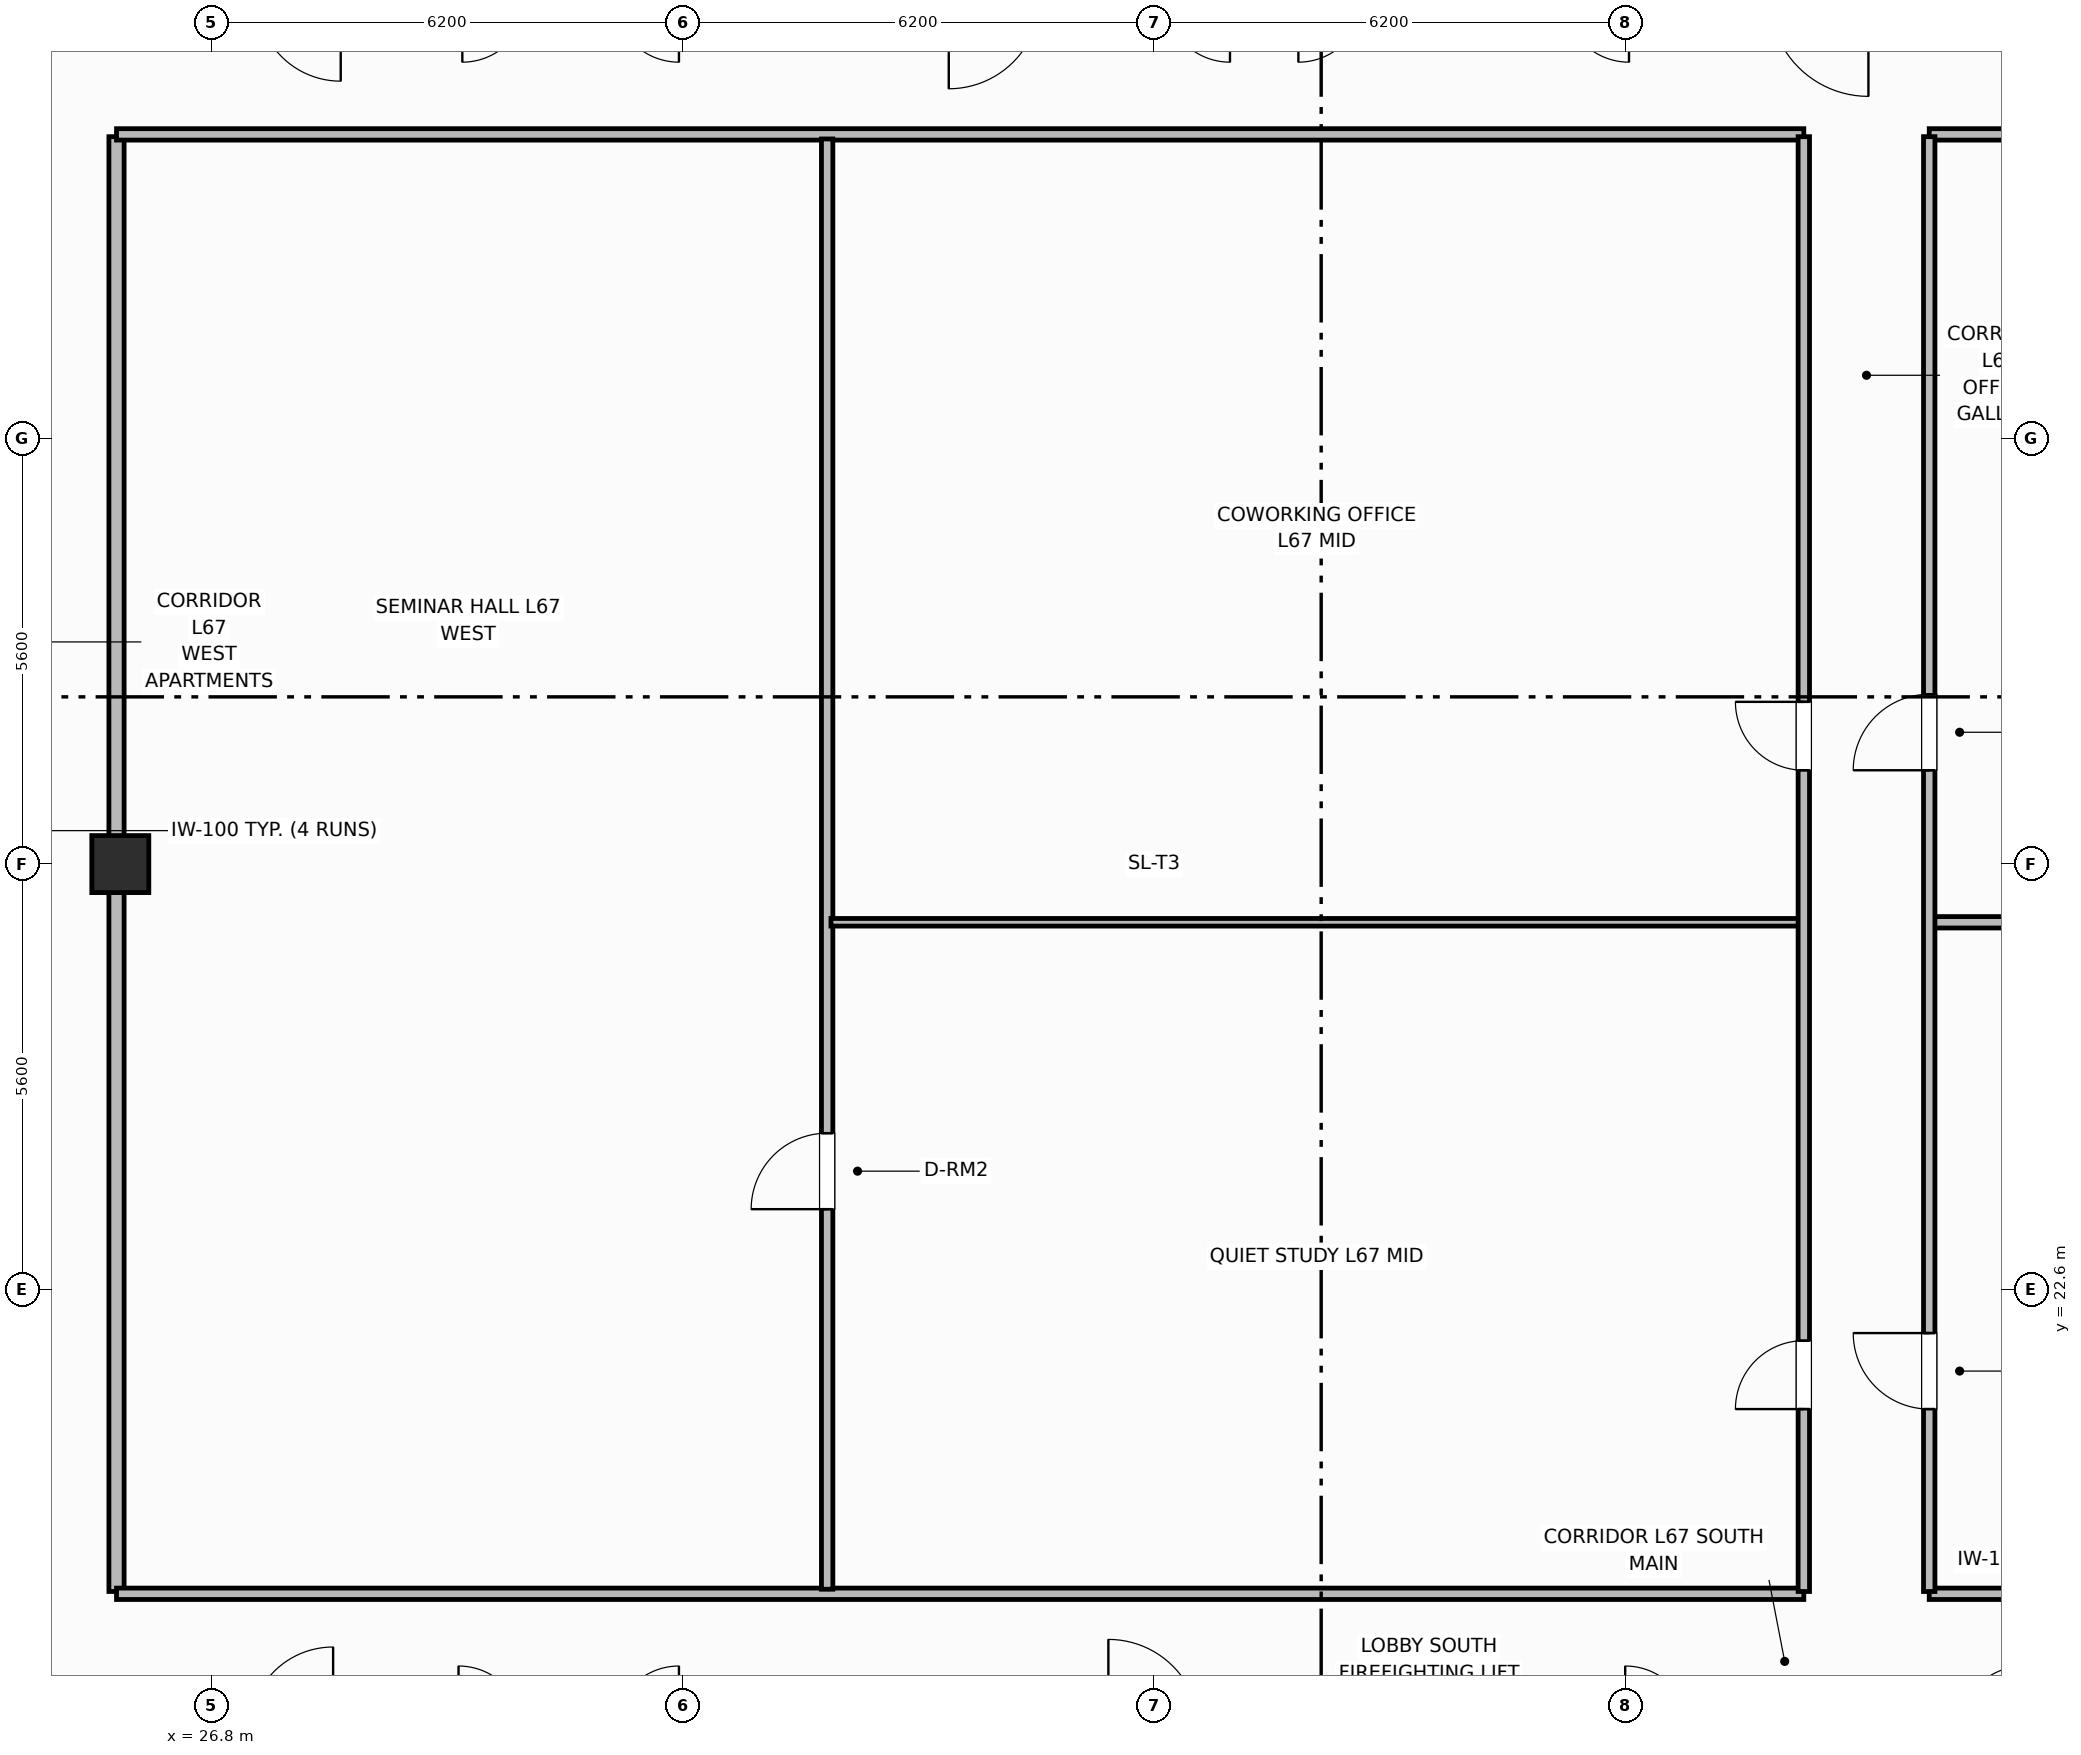
"""IFC4 building model, lengths in metres.
Left out: names, types, materials, properties, quantities, classifications, styles, units other than length and angle.
Written with IfcOpenShell. Run it as: python <this file> out.ifc"""

import sys

from ifc_helpers import new_model, si_unit, direction, frame, frame_2d, origin, origin_2d, place, context, subcontext, project, spatial, rectangle, extrude, element, fill, save


model = new_model("IFC4")
c1 = context("Model", 3, precision=1e-05, world=origin(), true_north=direction((0.0, 1.0)))
c2 = subcontext(c1, "Body", "Model", "MODEL_VIEW")
j1 = project(units=[si_unit("LENGTHUNIT", "METRE"), si_unit("PLANEANGLEUNIT", "RADIAN")], contexts=[c1])
p1 = place(None, origin())
s1 = spatial("IfcSite", under=j1, at=p1, CompositionType="ELEMENT")
p2 = place(p1, origin())
s2 = spatial("IfcBuilding", under=s1, at=p2, CompositionType="ELEMENT")
p3 = place(p2, frame((0.0, 0.0, 267.6)))
s3 = spatial("IfcBuildingStorey", under=s2, at=p3, CompositionType="ELEMENT", Elevation=267.6)
p4 = place(p3, frame((25.6, 28.2, 0.0), z_axis=(0.0, 0.0, 1.0), x_axis=(1.0, 0.0, 0.0)))
e1 = element("IfcColumn", 1, at=p4, inside=s3, PredefinedType="COLUMN", context=c2, shape_type="SweptSolid", body=[
    extrude(rectangle(XDim=0.75, YDim=0.75, at=origin_2d()), origin(), (0.0, 0.0, 1.0), 3.7),
])
p5 = place(p3, frame((25.55, 18.63, 0.0), z_axis=(0.0, 0.0, 1.0), x_axis=(0.0, 1.0, 0.0)))
e2 = element("IfcWall", 2, at=p5, inside=s3, PredefinedType="PARTITIONING", context=c2, shape_type="SweptSolid", body=[
    extrude(rectangle(XDim=19.14, YDim=0.2, at=frame_2d((9.57, 0.0))), origin(), (0.0, 0.0, 1.0), 2.56),
])
p6 = place(p3, frame((25.55, 18.6, 0.0), z_axis=(0.0, 0.0, 1.0), x_axis=(1.0, 0.0, 0.0)))
e3 = element("IfcWall", 3, at=p6, inside=s3, PredefinedType="PARTITIONING", context=c2, shape_type="SweptSolid", body=[
    extrude(rectangle(XDim=22.2, YDim=0.15, at=frame_2d((11.1, 0.0))), origin(), (0.0, 0.0, 1.0), 2.56),
])
p7 = place(p3, frame((49.4, 18.6, 0.0), z_axis=(0.0, 0.0, 1.0), x_axis=(1.0, 0.0, 0.0)))
e4 = element("IfcWall", 4, at=p7, inside=s3, PredefinedType="PARTITIONING", context=c2, shape_type="SweptSolid", body=[
    extrude(rectangle(XDim=3.45, YDim=0.15, at=frame_2d((1.725, 0.0))), origin(), (0.0, 0.0, 1.0), 2.56),
])
p8 = place(p3, frame((25.55, 37.8, 0.0), z_axis=(0.0, 0.0, 1.0), x_axis=(1.0, 0.0, 0.0)))
e5 = element("IfcWall", 5, at=p8, inside=s3, PredefinedType="PARTITIONING", context=c2, shape_type="SweptSolid", body=[
    extrude(rectangle(XDim=22.2, YDim=0.15, at=frame_2d((11.1, 0.0))), origin(), (0.0, 0.0, 1.0), 2.56),
])
p9 = place(p3, frame((49.4, 37.8, 0.0), z_axis=(0.0, 0.0, 1.0), x_axis=(1.0, 0.0, 0.0)))
e6 = element("IfcWall", 6, at=p9, inside=s3, PredefinedType="PARTITIONING", context=c2, shape_type="SweptSolid", body=[
    extrude(rectangle(XDim=3.45, YDim=0.15, at=frame_2d((1.725, 0.0))), origin(), (0.0, 0.0, 1.0), 2.56),
])
p10 = place(p3, frame((34.9, 18.66, 0.0), z_axis=(0.0, 0.0, 1.0), x_axis=(0.0, 1.0, 0.0)))
e7 = element("IfcWall", 7, at=p10, inside=s3, PredefinedType="PARTITIONING", context=c2, shape_type="SweptSolid", body=[
    extrude(rectangle(XDim=19.08, YDim=0.15, at=frame_2d((9.54, 0.0))), origin(), (0.0, 0.0, 1.0), 2.56),
])
p11 = place(p10, frame((5.0, 0.0, 0.0)))
e8 = element("IfcOpeningElement", 8, at=p11, cuts=e7, PredefinedType="OPENING", context=c2, shape_type="SweptSolid", body=[
    extrude(rectangle(XDim=1.0, YDim=2.15, at=frame_2d((0.5, 1.075))), frame((0.0, 0.085, 0.0), z_axis=(0.0, -1.0, 0.0), x_axis=(1.0, 0.0, 0.0)), (0.0, 0.0, 1.0), 0.17),
])
p12 = place(p3, frame((34.95, 27.434, 0.0), z_axis=(0.0, 0.0, 1.0), x_axis=(1.0, 0.0, 0.0)))
e9 = element("IfcWall", 9, at=p12, inside=s3, PredefinedType="PARTITIONING", context=c2, shape_type="SweptSolid", body=[
    extrude(rectangle(XDim=12.81, YDim=0.1, at=frame_2d((6.405, 0.0))), origin(), (0.0, 0.0, 1.0), 2.56),
])
p13 = place(p3, frame((49.43, 27.434, 0.0), z_axis=(0.0, 0.0, 1.0), x_axis=(1.0, 0.0, 0.0)))
e10 = element("IfcWall", 10, at=p13, inside=s3, PredefinedType="PARTITIONING", context=c2, shape_type="SweptSolid", body=[
    extrude(rectangle(XDim=3.37, YDim=0.15, at=frame_2d((1.685, 0.0))), origin(), (0.0, 0.0, 1.0), 2.56),
])
p14 = place(p3, frame((47.75, 18.63, 0.0), z_axis=(0.0, 0.0, 1.0), x_axis=(0.0, 1.0, 0.0)))
e11 = element("IfcWall", 11, at=p14, inside=s3, PredefinedType="PARTITIONING", context=c2, shape_type="SweptSolid", body=[
    extrude(rectangle(XDim=19.14, YDim=0.15, at=frame_2d((9.57, 0.0))), origin(), (0.0, 0.0, 1.0), 2.56),
])
p15 = place(p14, frame((2.4, 0.0, 0.0)))
e12 = element("IfcOpeningElement", 12, at=p15, cuts=e11, PredefinedType="OPENING", context=c2, shape_type="SweptSolid", body=[
    extrude(rectangle(XDim=0.9, YDim=2.1, at=frame_2d((0.45, 1.05))), frame((0.0, 0.085, 0.0), z_axis=(0.0, -1.0, 0.0), x_axis=(1.0, 0.0, 0.0)), (0.0, 0.0, 1.0), 0.17),
])
p16 = place(p14, frame((10.804, 0.0, 0.0)))
e13 = element("IfcOpeningElement", 13, at=p16, cuts=e11, PredefinedType="OPENING", context=c2, shape_type="SweptSolid", body=[
    extrude(rectangle(XDim=0.9, YDim=2.1, at=frame_2d((0.45, 1.05))), frame((0.0, 0.085, 0.0), z_axis=(0.0, -1.0, 0.0), x_axis=(1.0, 0.0, 0.0)), (0.0, 0.0, 1.0), 0.17),
])
p17 = place(p3, frame((49.4, 18.63, 0.0), z_axis=(0.0, 0.0, 1.0), x_axis=(0.0, 1.0, 0.0)))
e14 = element("IfcWall", 14, at=p17, inside=s3, PredefinedType="PARTITIONING", context=c2, shape_type="SweptSolid", body=[
    extrude(rectangle(XDim=19.14, YDim=0.15, at=frame_2d((9.57, 0.0))), origin(), (0.0, 0.0, 1.0), 2.56),
])
p18 = place(p17, frame((2.4, 0.0, 0.0)))
e15 = element("IfcOpeningElement", 15, at=p18, cuts=e14, PredefinedType="OPENING", context=c2, shape_type="SweptSolid", body=[
    extrude(rectangle(XDim=1.0, YDim=2.15, at=frame_2d((0.5, 1.075))), frame((0.0, 0.085, 0.0), z_axis=(0.0, -1.0, 0.0), x_axis=(1.0, 0.0, 0.0)), (0.0, 0.0, 1.0), 0.17),
])
p19 = place(p17, frame((10.804, 0.0, 0.0)))
e16 = element("IfcOpeningElement", 16, at=p19, cuts=e14, PredefinedType="OPENING", context=c2, shape_type="SweptSolid", body=[
    extrude(rectangle(XDim=1.0, YDim=2.15, at=frame_2d((0.5, 1.075))), frame((0.0, 0.085, 0.0), z_axis=(0.0, -1.0, 0.0), x_axis=(1.0, 0.0, 0.0)), (0.0, 0.0, 1.0), 0.17),
])
p20 = place(p11, origin())
e17 = element("IfcDoor", 17, at=p20, inside=s3, OperationType="SINGLE_SWING_LEFT", PredefinedType="DOOR", context=c2, shape_type="SweptSolid", body=[
    extrude(rectangle(XDim=1.0, YDim=2.15, at=frame_2d((0.5, 1.075))), frame((0.0, 0.025, 0.0), z_axis=(0.0, -1.0, 0.0), x_axis=(1.0, 0.0, 0.0)), (0.0, 0.0, 1.0), 0.05),
])
fill(e8, e17)
p21 = place(p15, origin())
e18 = element("IfcDoor", 18, at=p21, inside=s3, OperationType="SINGLE_SWING_LEFT", PredefinedType="DOOR", context=c2, shape_type="SweptSolid", body=[
    extrude(rectangle(XDim=0.9, YDim=2.1, at=frame_2d((0.45, 1.05))), frame((0.0, 0.025, 0.0), z_axis=(0.0, -1.0, 0.0), x_axis=(1.0, 0.0, 0.0)), (0.0, 0.0, 1.0), 0.05),
])
fill(e12, e18)
p22 = place(p16, origin())
e19 = element("IfcDoor", 19, at=p22, inside=s3, OperationType="SINGLE_SWING_RIGHT", PredefinedType="DOOR", context=c2, shape_type="SweptSolid", body=[
    extrude(rectangle(XDim=0.9, YDim=2.1, at=frame_2d((0.45, 1.05))), frame((0.0, 0.025, 0.0), z_axis=(0.0, -1.0, 0.0), x_axis=(1.0, 0.0, 0.0)), (0.0, 0.0, 1.0), 0.05),
])
fill(e13, e19)
p23 = place(p18, origin())
e20 = element("IfcDoor", 20, at=p23, inside=s3, OperationType="SINGLE_SWING_RIGHT", PredefinedType="DOOR", context=c2, shape_type="SweptSolid", body=[
    extrude(rectangle(XDim=1.0, YDim=2.15, at=frame_2d((0.5, 1.075))), frame((0.0, 0.025, 0.0), z_axis=(0.0, -1.0, 0.0), x_axis=(1.0, 0.0, 0.0)), (0.0, 0.0, 1.0), 0.05),
])
fill(e15, e20)
p24 = place(p19, origin())
e21 = element("IfcDoor", 21, at=p24, inside=s3, OperationType="SINGLE_SWING_LEFT", PredefinedType="DOOR", context=c2, shape_type="SweptSolid", body=[
    extrude(rectangle(XDim=1.0, YDim=2.15, at=frame_2d((0.5, 1.075))), frame((0.0, 0.025, 0.0), z_axis=(0.0, -1.0, 0.0), x_axis=(1.0, 0.0, 0.0)), (0.0, 0.0, 1.0), 0.05),
])
fill(e16, e21)
save(model, sys.argv[1])
